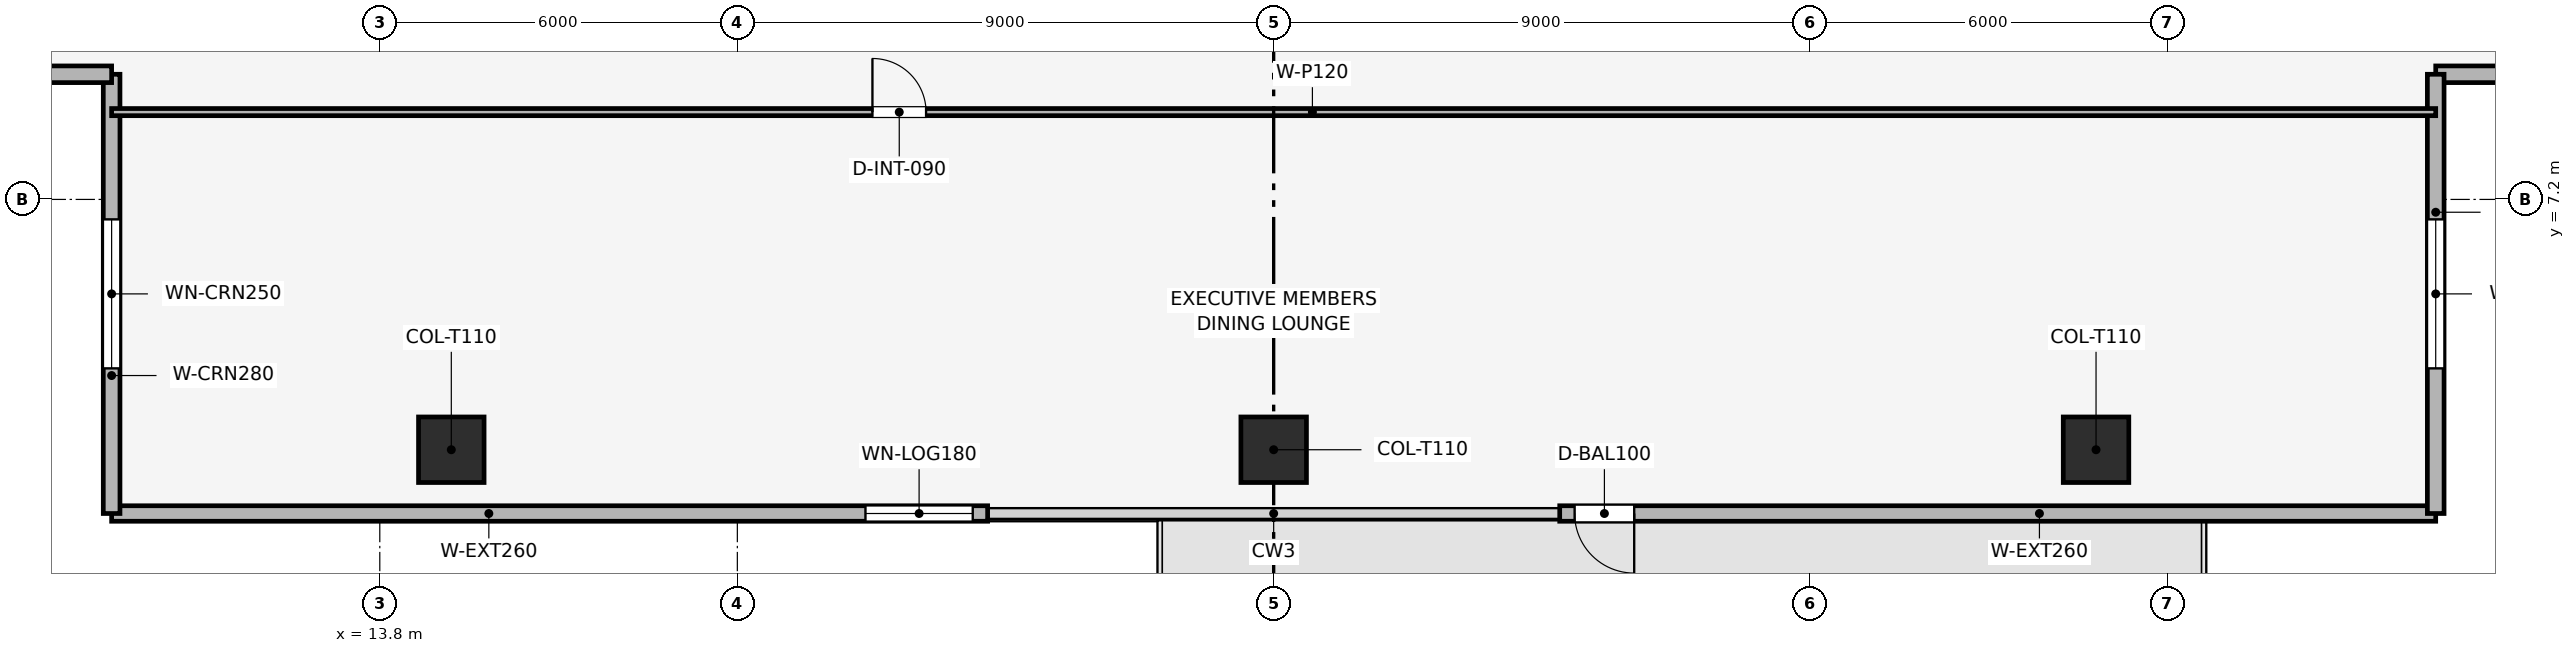
"""IFC4 building model, lengths in metres.
Left out: names, types, materials, properties, quantities, classifications, styles, units other than length and angle.
Written with IfcOpenShell. Run it as: python <this file> out.ifc"""

import sys

from ifc_helpers import new_model, si_unit, direction, frame, frame_2d, origin, origin_2d, place, context, subcontext, project, spatial, rectangle, extrude, element, fill, save


model = new_model("IFC4")
c1 = context("Model", 3, precision=1e-05, world=origin(), true_north=direction((0.0, 1.0)))
c2 = subcontext(c1, "Body", "Model", "MODEL_VIEW")
j1 = project(units=[si_unit("LENGTHUNIT", "METRE"), si_unit("PLANEANGLEUNIT", "RADIAN")], contexts=[c1])
p1 = place(None, origin())
s1 = spatial("IfcSite", under=j1, at=p1, CompositionType="ELEMENT")
p2 = place(p1, origin())
s2 = spatial("IfcBuilding", under=s1, at=p2, CompositionType="ELEMENT")
p3 = place(p2, frame((0.0, 0.0, 237.45)))
s3 = spatial("IfcBuildingStorey", under=s2, at=p3, CompositionType="ELEMENT", Elevation=237.45)
for number, where, z_axis, x_axis in (
    (1, (15.0, 3.0, 0.003), (0.0, 0.0, 1.0), (1.0, 0.0, 0.0)),
    (2, (28.8, 3.0, 0.003), (0.0, 0.0, 1.0), (1.0, 0.0, 0.0)),
    (3, (42.6, 3.0, 0.003), (0.0, 0.0, 1.0), (1.0, 0.0, 0.0)),
):
    element("IfcColumn", number, at=place(p3, frame(where, z_axis=z_axis, x_axis=x_axis)), inside=s3, PredefinedType="COLUMN", context=c2, shape_type="SweptSolid", body=[
        extrude(rectangle(XDim=1.1, YDim=1.1, at=origin_2d()), origin(), (0.0, 0.0, 1.0), 3.494),
    ])
p4 = place(p3, frame((48.3, 1.93, 0.0), z_axis=(0.0, 0.0, 1.0), x_axis=(-1.0, 0.0, 0.0)))
e4 = element("IfcWall", 4, at=p4, inside=s3, PredefinedType="SOLIDWALL", context=c2, shape_type="SweptSolid", body=[
    extrude(rectangle(XDim=14.7, YDim=0.26, at=frame_2d((7.35, 0.0))), origin(), (0.0, 0.0, 1.0), 3.5),
])
p5 = place(p4, frame((13.45, 0.0, 0.0)))
e5 = element("IfcOpeningElement", 5, at=p5, cuts=e4, PredefinedType="OPENING", context=c2, shape_type="SweptSolid", body=[
    extrude(rectangle(XDim=1.0, YDim=2.2, at=frame_2d((0.5, 1.1))), frame((0.0, 0.14, 0.0), z_axis=(0.0, -1.0, 0.0), x_axis=(1.0, 0.0, 0.0)), (0.0, 0.0, 1.0), 0.28),
])
p6 = place(p3, frame((24.0, 1.93, 0.0), z_axis=(0.0, 0.0, 1.0), x_axis=(-1.0, 0.0, 0.0)))
e6 = element("IfcWall", 6, at=p6, inside=s3, PredefinedType="SOLIDWALL", context=c2, shape_type="SweptSolid", body=[
    extrude(rectangle(XDim=14.7, YDim=0.26, at=frame_2d((7.35, 0.0))), origin(), (0.0, 0.0, 1.0), 3.5),
])
p7 = place(p6, frame((0.25, 0.0, 0.72)))
e7 = element("IfcOpeningElement", 7, at=p7, cuts=e6, PredefinedType="OPENING", context=c2, shape_type="SweptSolid", body=[
    extrude(rectangle(XDim=1.8, YDim=2.1, at=frame_2d((0.9, 1.05))), frame((0.0, 0.14, 0.0), z_axis=(0.0, -1.0, 0.0), x_axis=(1.0, 0.0, 0.0)), (0.0, 0.0, 1.0), 0.28),
])
p8 = place(p3, frame((9.3, 1.93, 0.0), z_axis=(0.0, 0.0, 1.0), x_axis=(0.0, 1.0, 0.0)))
e8 = element("IfcWall", 8, at=p8, inside=s3, PredefinedType="SOLIDWALL", context=c2, shape_type="SweptSolid", body=[
    extrude(rectangle(XDim=7.37, YDim=0.28, at=frame_2d((3.685, 0.0))), origin(), (0.0, 0.0, 1.0), 3.5),
])
p9 = place(p8, frame((2.435, 0.0, 0.72)))
e9 = element("IfcOpeningElement", 9, at=p9, cuts=e8, PredefinedType="OPENING", context=c2, shape_type="SweptSolid", body=[
    extrude(rectangle(XDim=2.5, YDim=1.9, at=frame_2d((1.25, 0.95))), frame((0.0, 0.15, 0.0), z_axis=(0.0, -1.0, 0.0), x_axis=(1.0, 0.0, 0.0)), (0.0, 0.0, 1.0), 0.3),
])
p10 = place(p3, frame((9.3, 9.3, 0.0), z_axis=(0.0, 0.0, 1.0), x_axis=(-1.0, 0.0, 0.0)))
e10 = element("IfcWall", 10, at=p10, inside=s3, PredefinedType="SOLIDWALL", context=c2, shape_type="SweptSolid", body=[
    extrude(rectangle(XDim=7.37, YDim=0.28, at=frame_2d((3.685, 0.0))), origin(), (0.0, 0.0, 1.0), 3.5),
])
p11 = place(p10, frame((2.435, 0.0, 0.72)))
e11 = element("IfcOpeningElement", 11, at=p11, cuts=e10, PredefinedType="OPENING", context=c2, shape_type="SweptSolid", body=[
    extrude(rectangle(XDim=2.5, YDim=1.9, at=frame_2d((1.25, 0.95))), frame((0.0, 0.15, 0.0), z_axis=(0.0, -1.0, 0.0), x_axis=(1.0, 0.0, 0.0)), (0.0, 0.0, 1.0), 0.3),
])
p12 = place(p3, frame((55.67, 9.3, 0.0), z_axis=(0.0, 0.0, 1.0), x_axis=(-1.0, 0.0, 0.0)))
e12 = element("IfcWall", 12, at=p12, inside=s3, PredefinedType="SOLIDWALL", context=c2, shape_type="SweptSolid", body=[
    extrude(rectangle(XDim=7.37, YDim=0.28, at=frame_2d((3.685, 0.0))), origin(), (0.0, 0.0, 1.0), 3.5),
])
p13 = place(p12, frame((2.435, 0.0, 0.72)))
e13 = element("IfcOpeningElement", 13, at=p13, cuts=e12, PredefinedType="OPENING", context=c2, shape_type="SweptSolid", body=[
    extrude(rectangle(XDim=2.5, YDim=1.9, at=frame_2d((1.25, 0.95))), frame((0.0, 0.15, 0.0), z_axis=(0.0, -1.0, 0.0), x_axis=(1.0, 0.0, 0.0)), (0.0, 0.0, 1.0), 0.3),
])
p14 = place(p3, frame((48.3, 9.3, 0.0), z_axis=(0.0, 0.0, 1.0), x_axis=(0.0, -1.0, 0.0)))
e14 = element("IfcWall", 14, at=p14, inside=s3, PredefinedType="SOLIDWALL", context=c2, shape_type="SweptSolid", body=[
    extrude(rectangle(XDim=7.37, YDim=0.28, at=frame_2d((3.685, 0.0))), origin(), (0.0, 0.0, 1.0), 3.5),
])
p15 = place(p14, frame((2.435, 0.0, 0.72)))
e15 = element("IfcOpeningElement", 15, at=p15, cuts=e14, PredefinedType="OPENING", context=c2, shape_type="SweptSolid", body=[
    extrude(rectangle(XDim=2.5, YDim=1.9, at=frame_2d((1.25, 0.95))), frame((0.0, 0.15, 0.0), z_axis=(0.0, -1.0, 0.0), x_axis=(1.0, 0.0, 0.0)), (0.0, 0.0, 1.0), 0.3),
])
p16 = place(p3, frame((9.3, 8.665, 0.0), z_axis=(0.0, 0.0, 1.0), x_axis=(1.0, 0.0, 0.0)))
e16 = element("IfcWall", 16, at=p16, inside=s3, PredefinedType="PARTITIONING", context=c2, shape_type="SweptSolid", body=[
    extrude(rectangle(XDim=39.0, YDim=0.12, at=frame_2d((19.5, 0.0))), origin(), (0.0, 0.0, 1.0), 2.685),
])
p17 = place(p16, frame((12.767, 0.0, 0.0)))
e17 = element("IfcOpeningElement", 17, at=p17, cuts=e16, PredefinedType="OPENING", context=c2, shape_type="SweptSolid", body=[
    extrude(rectangle(XDim=0.9, YDim=2.1, at=frame_2d((0.45, 1.05))), frame((0.0, 0.07, 0.0), z_axis=(0.0, -1.0, 0.0), x_axis=(1.0, 0.0, 0.0)), (0.0, 0.0, 1.0), 0.14),
])
p18 = place(p5, origin())
e18 = element("IfcDoor", 18, at=p18, inside=s3, OperationType="SINGLE_SWING_LEFT", PredefinedType="DOOR", context=c2, shape_type="SweptSolid", body=[
    extrude(rectangle(XDim=1.0, YDim=2.2, at=frame_2d((0.5, 1.1))), frame((0.0, 0.025, 0.0), z_axis=(0.0, -1.0, 0.0), x_axis=(1.0, 0.0, 0.0)), (0.0, 0.0, 1.0), 0.05),
])
fill(e5, e18)
p19 = place(p7, origin())
e19 = element("IfcWindow", 19, at=p19, inside=s3, PartitioningType="SINGLE_PANEL", PredefinedType="WINDOW", context=c2, shape_type="SweptSolid", body=[
    extrude(rectangle(XDim=1.8, YDim=2.1, at=frame_2d((0.9, 1.05))), frame((0.0, 0.03, 0.0), z_axis=(0.0, -1.0, 0.0), x_axis=(1.0, 0.0, 0.0)), (0.0, 0.0, 1.0), 0.06),
])
fill(e7, e19)
p20 = place(p9, origin())
e20 = element("IfcWindow", 20, at=p20, inside=s3, PartitioningType="SINGLE_PANEL", PredefinedType="WINDOW", context=c2, shape_type="SweptSolid", body=[
    extrude(rectangle(XDim=2.5, YDim=1.9, at=frame_2d((1.25, 0.95))), frame((0.0, 0.03, 0.0), z_axis=(0.0, -1.0, 0.0), x_axis=(1.0, 0.0, 0.0)), (0.0, 0.0, 1.0), 0.06),
])
fill(e9, e20)
p21 = place(p15, origin())
e21 = element("IfcWindow", 21, at=p21, inside=s3, PartitioningType="SINGLE_PANEL", PredefinedType="WINDOW", context=c2, shape_type="SweptSolid", body=[
    extrude(rectangle(XDim=2.5, YDim=1.9, at=frame_2d((1.25, 0.95))), frame((0.0, 0.03, 0.0), z_axis=(0.0, -1.0, 0.0), x_axis=(1.0, 0.0, 0.0)), (0.0, 0.0, 1.0), 0.06),
])
fill(e15, e21)
p22 = place(p17, origin())
e22 = element("IfcDoor", 22, at=p22, inside=s3, OperationType="SINGLE_SWING_LEFT", PredefinedType="DOOR", context=c2, shape_type="SweptSolid", body=[
    extrude(rectangle(XDim=0.9, YDim=2.1, at=frame_2d((0.45, 1.05))), frame((0.0, 0.025, 0.0), z_axis=(0.0, -1.0, 0.0), x_axis=(1.0, 0.0, 0.0)), (0.0, 0.0, 1.0), 0.05),
])
fill(e17, e22)
save(model, sys.argv[1])
